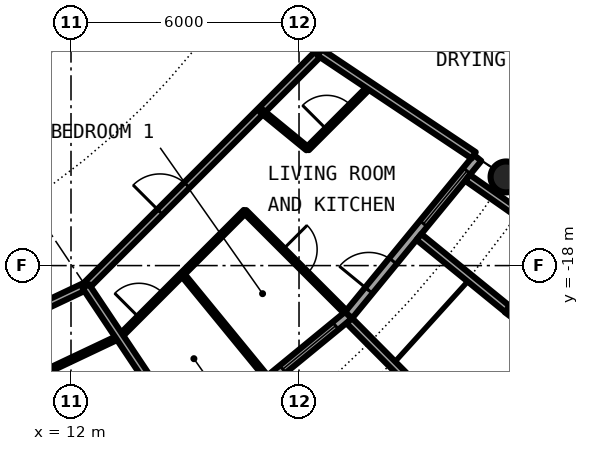
"""IFC4 building model, lengths in metres.
Left out: names, types, materials, properties, quantities, classifications, styles, units other than length and angle.
Written with IfcOpenShell. Run it as: python <this file> out.ifc"""

import sys

from ifc_helpers import new_model, si_unit, direction, frame, frame_2d, origin, origin_2d, place, context, subcontext, project, spatial, rectangle, circle, hollow_circle, extrude, element, fill, save


model = new_model("IFC4")
c1 = context("Model", 3, precision=1e-05, world=origin(), true_north=direction((0.0, 1.0)))
c2 = subcontext(c1, "Body", "Model", "MODEL_VIEW")
j1 = project(units=[si_unit("LENGTHUNIT", "METRE"), si_unit("PLANEANGLEUNIT", "RADIAN")], contexts=[c1])
p1 = place(None, origin())
s1 = spatial("IfcSite", under=j1, at=p1, CompositionType="ELEMENT")
p2 = place(p1, origin())
s2 = spatial("IfcBuilding", under=s1, at=p2, CompositionType="ELEMENT")
p3 = place(p2, frame((0.0, 0.0, 218.8)))
s3 = spatial("IfcBuildingStorey", under=s2, at=p3, CompositionType="ELEMENT", Elevation=218.8)
p4 = place(p3, frame((23.448, -15.667, 0.0), z_axis=(0.0, 0.0, 1.0), x_axis=(1.0, 0.0, 0.0)))
e1 = element("IfcColumn", 1, at=p4, inside=s3, PredefinedType="COLUMN", context=c2, shape_type="SweptSolid", body=[
    extrude(hollow_circle(Radius=0.406, WallThickness=0.03, at=origin_2d()), origin(), (0.0, 0.0, 1.0), 3.05),
])
p5 = place(p3, frame((15.167, -22.699, 0.0), z_axis=(0.0, 0.0, 1.0), x_axis=(0.773019449054, 0.634382322723, 0.0)))
e2 = element("IfcWall", 2, at=p5, inside=s3, PredefinedType="SOLIDWALL", context=c2, shape_type="SweptSolid", body=[
    extrude(rectangle(XDim=5.352, YDim=0.25, at=frame_2d((2.676, 0.0))), origin(), (0.0, 0.0, 1.0), 2.65),
])
p6 = place(p5, frame((0.841, 0.0, 0.0)))
e3 = element("IfcOpeningElement", 3, at=p6, cuts=e2, PredefinedType="OPENING", context=c2, shape_type="SweptSolid", body=[
    extrude(rectangle(XDim=1.0, YDim=2.2, at=frame_2d((0.5, 1.1))), frame((0.0, 0.135, 0.0), z_axis=(0.0, -1.0, 0.0), x_axis=(1.0, 0.0, 0.0)), (0.0, 0.0, 1.0), 0.27),
])
p7 = place(p5, frame((3.111, 0.0, 0.3)))
e4 = element("IfcOpeningElement", 4, at=p7, cuts=e2, PredefinedType="OPENING", context=c2, shape_type="SweptSolid", body=[
    extrude(rectangle(XDim=1.8, YDim=2.1, at=frame_2d((0.9, 1.05))), frame((0.0, 0.135, 0.0), z_axis=(0.0, -1.0, 0.0), x_axis=(1.0, 0.0, 0.0)), (0.0, 0.0, 1.0), 0.27),
])
p8 = place(p3, frame((19.323, -19.45, -0.03), z_axis=(0.0, 0.0, 1.0), x_axis=(0.704476739375, -0.709727076896, 0.0)))
e5 = element("IfcWall", 5, at=p8, inside=s3, PredefinedType="SOLIDWALL", context=c2, shape_type="SweptSolid", body=[
    extrude(rectangle(XDim=2.883, YDim=0.2, at=frame_2d((1.441, 0.0))), origin(), (0.0, 0.0, 1.0), 2.68),
])
p9 = place(p3, frame((19.304, -19.304, 0.0), z_axis=(0.0, 0.0, 1.0), x_axis=(0.634382322723, 0.773019449054, 0.0)))
e6 = element("IfcWall", 6, at=p9, inside=s3, PredefinedType="SOLIDWALL", context=c2, shape_type="SweptSolid", body=[
    extrude(rectangle(XDim=5.352, YDim=0.25, at=frame_2d((2.676, 0.0))), origin(), (0.0, 0.0, 1.0), 2.65),
])
p10 = place(p9, frame((0.841, 0.0, 0.0)))
e7 = element("IfcOpeningElement", 7, at=p10, cuts=e6, PredefinedType="OPENING", context=c2, shape_type="SweptSolid", body=[
    extrude(rectangle(XDim=1.0, YDim=2.2, at=frame_2d((0.5, 1.1))), frame((0.0, 0.135, 0.0), z_axis=(0.0, -1.0, 0.0), x_axis=(1.0, 0.0, 0.0)), (0.0, 0.0, 1.0), 0.27),
])
p11 = place(p9, frame((3.111, 0.0, 0.3)))
e8 = element("IfcOpeningElement", 8, at=p11, cuts=e6, PredefinedType="OPENING", context=c2, shape_type="SweptSolid", body=[
    extrude(rectangle(XDim=1.8, YDim=2.1, at=frame_2d((0.9, 1.05))), frame((0.0, 0.135, 0.0), z_axis=(0.0, -1.0, 0.0), x_axis=(1.0, 0.0, 0.0)), (0.0, 0.0, 1.0), 0.27),
])
p12 = place(p3, frame((23.497, -19.289, -0.03), z_axis=(0.0, 0.0, 1.0), x_axis=(0.602806268067, 0.797887588059, 0.0)))
e9 = element("IfcWall", 9, at=p12, inside=s3, PredefinedType="SOLIDWALL", context=c2, shape_type="SweptSolid", body=[
    extrude(rectangle(XDim=2.447, YDim=0.2, at=frame_2d((1.223, 0.0))), origin(), (0.0, 0.0, 1.0), 2.68),
])
p13 = place(p12, frame((0.183, 0.0, 0.33)))
e10 = element("IfcOpeningElement", 10, at=p13, cuts=e9, PredefinedType="OPENING", context=c2, shape_type="SweptSolid", body=[
    extrude(circle(Radius=1.04, at=frame_2d((1.04, 1.04))), frame((0.0, 0.11, 0.0), z_axis=(0.0, -1.0, 0.0), x_axis=(1.0, 0.0, 0.0)), (0.0, 0.0, 1.0), 0.22),
])
p14 = place(p3, frame((21.155, -17.246, -0.03), z_axis=(0.0, 0.0, 1.0), x_axis=(0.775179004516, -0.631741648902, 0.0)))
e11 = element("IfcWall", 11, at=p14, inside=s3, PredefinedType="SOLIDWALL", context=c2, shape_type="SweptSolid", body=[
    extrude(rectangle(XDim=3.006, YDim=0.2, at=frame_2d((1.503, 0.0))), origin(), (0.0, 0.0, 1.0), 2.68),
])
p15 = place(p3, frame((22.433, -15.688, -0.03), z_axis=(0.0, 0.0, 1.0), x_axis=(0.819373043115, -0.573260687834, 0.0)))
e12 = element("IfcWall", 12, at=p15, inside=s3, PredefinedType="SOLIDWALL", context=c2, shape_type="SweptSolid", body=[
    extrude(rectangle(XDim=2.925, YDim=0.2, at=frame_2d((1.463, 0.0))), origin(), (0.0, 0.0, 1.0), 2.68),
])
p16 = place(p3, frame((11.165, -20.872, 0.0), z_axis=(0.0, 0.0, 1.0), x_axis=(0.903888765148, 0.427767577359, 0.0)))
e13 = element("IfcWall", 13, at=p16, inside=s3, PredefinedType="PARTITIONING", context=c2, shape_type="SweptSolid", body=[
    extrude(rectangle(XDim=2.338, YDim=0.1, at=frame_2d((1.169, 0.0))), origin(), (0.0, 0.0, 1.0), 2.65),
])
p17 = place(p3, frame((13.285, -19.869, 0.0), z_axis=(0.0, 0.0, 1.0), x_axis=(0.706923494552, 0.707290020325, 0.0)))
e14 = element("IfcWall", 14, at=p17, inside=s3, PredefinedType="PARTITIONING", context=c2, shape_type="SweptSolid", body=[
    extrude(rectangle(XDim=4.663, YDim=0.1, at=frame_2d((2.331, 0.0))), origin(), (0.0, 0.0, 1.0), 2.65),
])
p18 = place(p17, frame((0.712, 0.0, 0.0)))
e15 = element("IfcOpeningElement", 15, at=p18, cuts=e14, PredefinedType="OPENING", context=c2, shape_type="SweptSolid", body=[
    extrude(rectangle(XDim=0.9, YDim=2.3, at=frame_2d((0.45, 1.15))), frame((0.0, 0.06, 0.0), z_axis=(0.0, -1.0, 0.0), x_axis=(1.0, 0.0, 0.0)), (0.0, 0.0, 1.0), 0.12),
])
p19 = place(p3, frame((18.224, -14.927, 0.0), z_axis=(0.0, 0.0, 1.0), x_axis=(0.706897299114, 0.707316201218, 0.0)))
e16 = element("IfcWall", 16, at=p19, inside=s3, PredefinedType="PARTITIONING", context=c2, shape_type="SweptSolid", body=[
    extrude(rectangle(XDim=2.331, YDim=0.1, at=frame_2d((1.166, 0.0))), origin(), (0.0, 0.0, 1.0), 2.65),
])
p20 = place(p19, frame((0.716, 0.0, 0.0)))
e17 = element("IfcOpeningElement", 17, at=p20, cuts=e16, PredefinedType="OPENING", context=c2, shape_type="SweptSolid", body=[
    extrude(rectangle(XDim=0.9, YDim=2.3, at=frame_2d((0.45, 1.15))), frame((0.0, 0.06, 0.0), z_axis=(0.0, -1.0, 0.0), x_axis=(1.0, 0.0, 0.0)), (0.0, 0.0, 1.0), 0.12),
])
p21 = place(p3, frame((18.542, -12.389, 0.0), z_axis=(0.0, 0.0, 1.0), x_axis=(0.465359652486, 0.885121683068, 0.0)))
e18 = element("IfcWall", 18, at=p21, inside=s3, PredefinedType="PARTITIONING", context=c2, shape_type="SweptSolid", body=[
    extrude(rectangle(XDim=1.665, YDim=0.2, at=frame_2d((0.833, 0.0))), origin(), (0.0, 0.0, 1.0), 2.65),
])
p22 = place(p3, frame((6.469, -21.342, 0.0), z_axis=(0.0, 0.0, 1.0), x_axis=(0.90398136628, 0.427571852931, 0.0)))
e19 = element("IfcWall", 19, at=p22, inside=s3, PredefinedType="PARTITIONING", context=c2, shape_type="SweptSolid", body=[
    extrude(rectangle(XDim=6.549, YDim=0.2, at=frame_2d((3.274, 0.0))), origin(), (0.0, 0.0, 1.0), 2.65),
])
p23 = place(p22, frame((3.867, 0.0, 0.0)))
e20 = element("IfcOpeningElement", 20, at=p23, cuts=e19, PredefinedType="OPENING", context=c2, shape_type="SweptSolid", body=[
    extrude(rectangle(XDim=1.0, YDim=2.3, at=frame_2d((0.5, 1.15))), frame((0.0, 0.11, 0.0), z_axis=(0.0, -1.0, 0.0), x_axis=(1.0, 0.0, 0.0)), (0.0, 0.0, 1.0), 0.22),
])
p24 = place(p3, frame((12.389, -18.542, 0.0), z_axis=(0.0, 0.0, 1.0), x_axis=(0.707106781187, 0.707106781187, 0.0)))
e21 = element("IfcWall", 21, at=p24, inside=s3, PredefinedType="PARTITIONING", context=c2, shape_type="SweptSolid", body=[
    extrude(rectangle(XDim=8.702, YDim=0.2, at=frame_2d((4.351, 0.0))), origin(), (0.0, 0.0, 1.0), 2.65),
])
p25 = place(p24, frame((2.763, 0.0, 0.0)))
e22 = element("IfcOpeningElement", 22, at=p25, cuts=e21, PredefinedType="OPENING", context=c2, shape_type="SweptSolid", body=[
    extrude(rectangle(XDim=1.0, YDim=2.3, at=frame_2d((0.5, 1.15))), frame((0.0, 0.11, 0.0), z_axis=(0.0, -1.0, 0.0), x_axis=(1.0, 0.0, 0.0)), (0.0, 0.0, 1.0), 0.22),
])
p26 = place(p3, frame((3.451, -17.361, 0.0), z_axis=(0.0, 0.0, 1.0), x_axis=(0.831492679744, 0.555535708603, 0.0)))
e23 = element("IfcWall", 23, at=p26, inside=s3, PredefinedType="PARTITIONING", context=c2, shape_type="SweptSolid", body=[
    extrude(rectangle(XDim=13.549, YDim=0.2, at=frame_2d((6.775, 0.0))), origin(), (0.0, 0.0, 1.0), 2.65),
])
p27 = place(p26, frame((4.583, 0.0, 0.0)))
e24 = element("IfcOpeningElement", 24, at=p27, cuts=e23, PredefinedType="OPENING", context=c2, shape_type="SweptSolid", body=[
    extrude(rectangle(XDim=1.0, YDim=2.3, at=frame_2d((0.5, 1.15))), frame((0.0, 0.11, 0.0), z_axis=(0.0, -1.0, 0.0), x_axis=(1.0, 0.0, 0.0)), (0.0, 0.0, 1.0), 0.22),
])
p28 = place(p3, frame((12.388, -18.543, 0.0), z_axis=(0.0, 0.0, 1.0), x_axis=(0.55555521993, -0.831479643532, 0.0)))
e25 = element("IfcWall", 25, at=p28, inside=s3, PredefinedType="PARTITIONING", context=c2, shape_type="SweptSolid", body=[
    extrude(rectangle(XDim=4.875, YDim=0.2, at=frame_2d((2.437, 0.0))), origin(), (0.0, 0.0, 1.0), 2.65),
])
p29 = place(p3, frame((14.927, -18.224, 0.0), z_axis=(0.0, 0.0, 1.0), x_axis=(0.633737383709, -0.773548271597, 0.0)))
e26 = element("IfcWall", 26, at=p29, inside=s3, PredefinedType="PARTITIONING", context=c2, shape_type="SweptSolid", body=[
    extrude(rectangle(XDim=3.618, YDim=0.1, at=frame_2d((1.809, 0.0))), origin(), (0.0, 0.0, 1.0), 2.65),
])
p30 = place(p3, frame((16.575, -16.575, 0.0), z_axis=(0.0, 0.0, 1.0), x_axis=(0.707106781187, -0.707106781187, 0.0)))
e27 = element("IfcWall", 27, at=p30, inside=s3, PredefinedType="PARTITIONING", context=c2, shape_type="SweptSolid", body=[
    extrude(rectangle(XDim=3.735, YDim=0.1, at=frame_2d((1.868, 0.0))), origin(), (0.0, 0.0, 1.0), 2.65),
])
p31 = place(p30, frame((1.417, 0.0, 0.0)))
e28 = element("IfcOpeningElement", 28, at=p31, cuts=e27, PredefinedType="OPENING", context=c2, shape_type="SweptSolid", body=[
    extrude(rectangle(XDim=0.9, YDim=2.3, at=frame_2d((0.45, 1.15))), frame((0.0, 0.06, 0.0), z_axis=(0.0, -1.0, 0.0), x_axis=(1.0, 0.0, 0.0)), (0.0, 0.0, 1.0), 0.12),
])
p32 = place(p3, frame((18.542, -12.389, 0.0), z_axis=(0.0, 0.0, 1.0), x_axis=(0.831387096605, -0.55569370664, 0.0)))
e29 = element("IfcWall", 29, at=p32, inside=s3, PredefinedType="PARTITIONING", context=c2, shape_type="SweptSolid", body=[
    extrude(rectangle(XDim=4.875, YDim=0.2, at=frame_2d((2.438, 0.0))), origin(), (0.0, 0.0, 1.0), 2.65),
])
p33 = place(p3, frame((17.004, -13.927, 0.0), z_axis=(0.0, 0.0, 1.0), x_axis=(0.773446828454, -0.633861186344, 0.0)))
e30 = element("IfcWall", 30, at=p33, inside=s3, PredefinedType="PARTITIONING", context=c2, shape_type="SweptSolid", body=[
    extrude(rectangle(XDim=1.578, YDim=0.1, at=frame_2d((0.789, 0.0))), origin(), (0.0, 0.0, 1.0), 2.65),
])
p34 = place(p7, origin())
e31 = element("IfcWindow", 31, at=p34, inside=s3, PartitioningType="SINGLE_PANEL", PredefinedType="WINDOW", context=c2, shape_type="SweptSolid", body=[
    extrude(rectangle(XDim=1.8, YDim=2.1, at=frame_2d((0.9, 1.05))), frame((0.0, 0.03, 0.0), z_axis=(0.0, -1.0, 0.0), x_axis=(1.0, 0.0, 0.0)), (0.0, 0.0, 1.0), 0.06),
])
fill(e4, e31)
p35 = place(p10, origin())
e32 = element("IfcDoor", 32, at=p35, inside=s3, OperationType="SINGLE_SWING_LEFT", PredefinedType="DOOR", context=c2, shape_type="SweptSolid", body=[
    extrude(rectangle(XDim=1.0, YDim=2.2, at=frame_2d((0.5, 1.1))), frame((0.0, 0.025, 0.0), z_axis=(0.0, -1.0, 0.0), x_axis=(1.0, 0.0, 0.0)), (0.0, 0.0, 1.0), 0.05),
])
fill(e7, e32)
p36 = place(p11, origin())
e33 = element("IfcWindow", 33, at=p36, inside=s3, PartitioningType="SINGLE_PANEL", PredefinedType="WINDOW", context=c2, shape_type="SweptSolid", body=[
    extrude(rectangle(XDim=1.8, YDim=2.1, at=frame_2d((0.9, 1.05))), frame((0.0, 0.03, 0.0), z_axis=(0.0, -1.0, 0.0), x_axis=(1.0, 0.0, 0.0)), (0.0, 0.0, 1.0), 0.06),
])
fill(e8, e33)
p37 = place(p25, origin())
e34 = element("IfcDoor", 34, at=p37, inside=s3, OperationType="SINGLE_SWING_LEFT", PredefinedType="DOOR", context=c2, shape_type="SweptSolid", body=[
    extrude(rectangle(XDim=1.0, YDim=2.3, at=frame_2d((0.5, 1.15))), frame((0.0, 0.025, 0.0), z_axis=(0.0, -1.0, 0.0), x_axis=(1.0, 0.0, 0.0)), (0.0, 0.0, 1.0), 0.05),
])
fill(e22, e34)
p38 = place(p20, origin())
e35 = element("IfcDoor", 35, at=p38, inside=s3, OperationType="SINGLE_SWING_RIGHT", PredefinedType="DOOR", context=c2, shape_type="SweptSolid", body=[
    extrude(rectangle(XDim=0.9, YDim=2.3, at=frame_2d((0.45, 1.15))), frame((0.0, 0.025, 0.0), z_axis=(0.0, -1.0, 0.0), x_axis=(1.0, 0.0, 0.0)), (0.0, 0.0, 1.0), 0.05),
])
fill(e17, e35)
p39 = place(p31, origin())
e36 = element("IfcDoor", 36, at=p39, inside=s3, OperationType="SINGLE_SWING_RIGHT", PredefinedType="DOOR", context=c2, shape_type="SweptSolid", body=[
    extrude(rectangle(XDim=0.9, YDim=2.3, at=frame_2d((0.45, 1.15))), frame((0.0, 0.025, 0.0), z_axis=(0.0, -1.0, 0.0), x_axis=(1.0, 0.0, 0.0)), (0.0, 0.0, 1.0), 0.05),
])
fill(e28, e36)
p40 = place(p18, origin())
e37 = element("IfcDoor", 37, at=p40, inside=s3, OperationType="SINGLE_SWING_LEFT", PredefinedType="DOOR", context=c2, shape_type="SweptSolid", body=[
    extrude(rectangle(XDim=0.9, YDim=2.3, at=frame_2d((0.45, 1.15))), frame((0.0, 0.025, 0.0), z_axis=(0.0, -1.0, 0.0), x_axis=(1.0, 0.0, 0.0)), (0.0, 0.0, 1.0), 0.05),
])
fill(e15, e37)
save(model, sys.argv[1])
